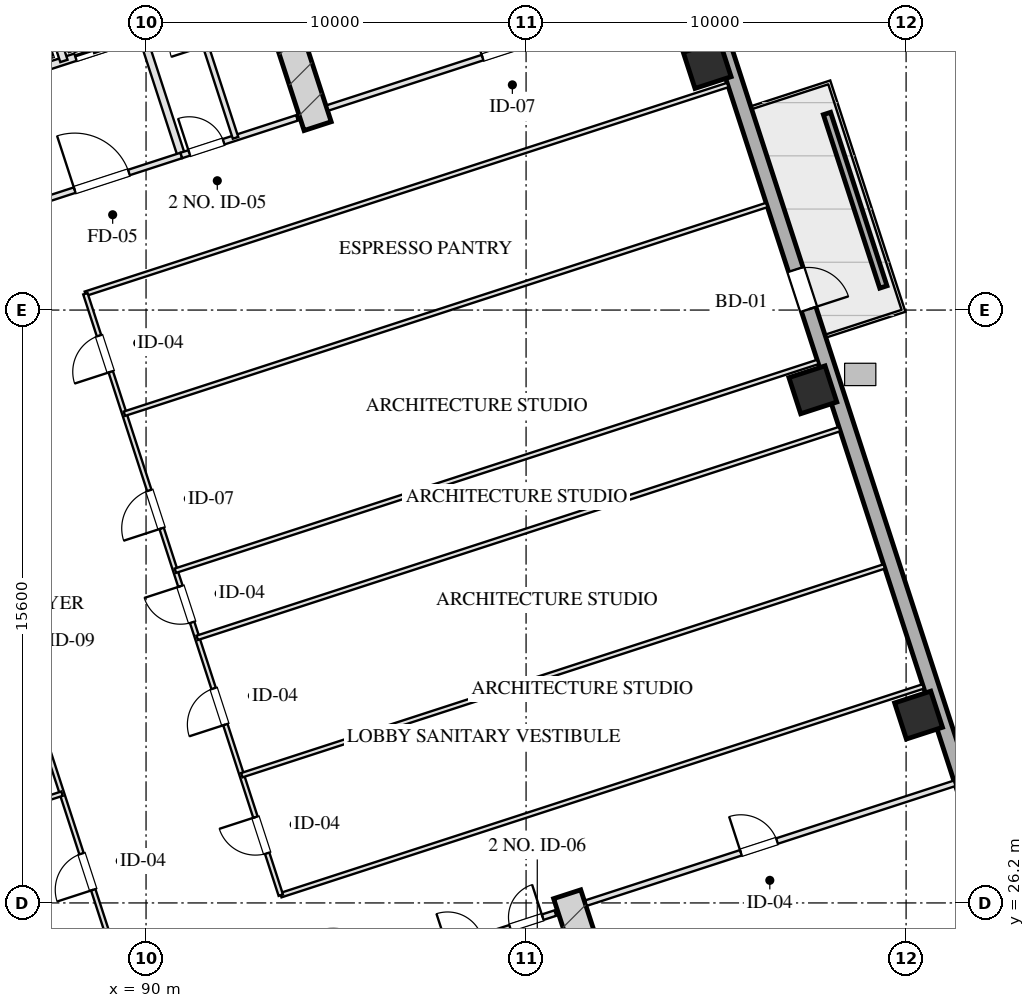
"""IFC4 building model, lengths in metres.
Left out: names, types, materials, properties, quantities, classifications, styles, units other than length and angle.
Written with IfcOpenShell. Run it as: python <this file> out.ifc"""

import sys

from ifc_helpers import new_model, si_unit, direction, frame, frame_2d, origin, origin_2d, place, context, subcontext, project, spatial, rectangle, hollow_rectangle, extrude, element, fill, save


model = new_model("IFC4")
c1 = context("Model", 3, precision=1e-05, world=origin(), true_north=direction((0.0, 1.0)))
c2 = subcontext(c1, "Body", "Model", "MODEL_VIEW")
j1 = project(units=[si_unit("LENGTHUNIT", "METRE"), si_unit("PLANEANGLEUNIT", "RADIAN")], contexts=[c1])
p1 = place(None, origin())
s1 = spatial("IfcSite", under=j1, at=p1, CompositionType="ELEMENT")
p2 = place(p1, origin())
s2 = spatial("IfcBuilding", under=s1, at=p2, CompositionType="ELEMENT")
p3 = place(p2, frame((0.0, 0.0, 57.5)))
s3 = spatial("IfcBuildingStorey", under=s2, at=p3, CompositionType="ELEMENT", Elevation=57.5)
for number, where, z_axis, x_axis in (
    (1, (101.082, 26.429, 0.0), (0.0, 0.0, 1.0), (0.309, -0.951, 0.0)),
    (2, (94.515, 46.639, 0.0), (0.0, 0.0, 1.0), (-0.309, 0.951, 0.0)),
):
    element("IfcWall", number, at=place(p3, frame(where, z_axis=z_axis, x_axis=x_axis)), inside=s3, PredefinedType="SHEAR", context=c2, shape_type="SweptSolid", body=[
        extrude(rectangle(XDim=9.63, YDim=0.75, at=frame_2d((4.815, 0.0))), origin(), (0.0, 0.0, 1.0), 3.45),
    ])
for number, where, z_axis, x_axis in (
    (3, (110.328, 31.142, 0.0), (0.0, 0.0, 1.0), (0.951, 0.309, 0.0)),
    (4, (107.547, 39.701, 0.0), (0.0, 0.0, 1.0), (0.951, 0.309, 0.0)),
    (5, (104.766, 48.261, 0.0), (0.0, 0.0, 1.0), (0.951, 0.309, 0.0)),
):
    element("IfcColumn", number, at=place(p3, frame(where, z_axis=z_axis, x_axis=x_axis)), inside=s3, PredefinedType="COLUMN", context=c2, shape_type="SweptSolid", body=[
        extrude(hollow_rectangle(XDim=1.0, YDim=1.0, WallThickness=0.036, at=origin_2d()), origin(), (0.0, 0.0, 1.0), 3.451),
    ])
p4 = place(p3, frame((100.345, 63.648, 0.0), z_axis=(0.0, 0.0, 1.0), x_axis=(0.309014526607, -0.951057318118, 0.0)))
e6 = element("IfcWall", 6, at=p4, inside=s3, PredefinedType="SOLIDWALL", context=c2, shape_type="SweptSolid", body=[
    extrude(rectangle(XDim=50.0, YDim=0.4, at=frame_2d((25.0, 0.0))), origin(), (0.0, 0.0, 1.0), 2.61),
])
p5 = place(p4, frame((21.85, 0.0, 0.0)))
e7 = element("IfcOpeningElement", 7, at=p5, cuts=e6, PredefinedType="OPENING", context=c2, shape_type="SweptSolid", body=[
    extrude(rectangle(XDim=1.1, YDim=2.15, at=frame_2d((0.55, 1.075))), frame((0.0, 0.21, 0.0), z_axis=(0.0, -1.0, 0.0), x_axis=(1.0, 0.0, 0.0)), (0.0, 0.0, 1.0), 0.42),
])
p6 = place(p3, frame((109.402, 42.407, 0.0), z_axis=(0.0, 0.0, 1.0), x_axis=(-0.30900096172, 0.951061725471, 0.0)))
e8 = element("IfcWall", 8, at=p6, inside=s3, PredefinedType="PARAPET", context=c2, shape_type="SweptSolid", body=[
    extrude(rectangle(XDim=4.8, YDim=0.2, at=frame_2d((2.4, 0.0))), origin(), (0.0, 0.0, 1.0), 0.75),
])
p7 = place(p3, frame((97.727, 24.944, 0.0), z_axis=(0.0, 0.0, 1.0), x_axis=(0.951036872128, 0.309077446369, 0.0)))
e9 = element("IfcWall", 9, at=p7, inside=s3, PredefinedType="PARTITIONING", context=c2, shape_type="SweptSolid", body=[
    extrude(rectangle(XDim=3.2, YDim=0.15, at=frame_2d((1.6, 0.0))), origin(), (0.0, 0.0, 1.0), 3.175),
])
p8 = place(p7, frame((0.22, 0.0, 0.0)))
e10 = element("IfcOpeningElement", 10, at=p8, cuts=e9, PredefinedType="OPENING", context=c2, shape_type="SweptSolid", body=[
    extrude(rectangle(XDim=0.95, YDim=2.05, at=frame_2d((0.475, 1.025))), frame((0.0, 0.085, 0.0), z_axis=(0.0, -1.0, 0.0), x_axis=(1.0, 0.0, 0.0)), (0.0, 0.0, 1.0), 0.17),
])
p9 = place(p7, frame((1.95, 0.0, 0.0)))
e11 = element("IfcOpeningElement", 11, at=p9, cuts=e9, PredefinedType="OPENING", context=c2, shape_type="SweptSolid", body=[
    extrude(rectangle(XDim=0.9, YDim=2.05, at=frame_2d((0.45, 1.025))), frame((0.0, 0.085, 0.0), z_axis=(0.0, -1.0, 0.0), x_axis=(1.0, 0.0, 0.0)), (0.0, 0.0, 1.0), 0.17),
])
p10 = place(p3, frame((90.928, 45.868, 0.0), z_axis=(0.0, 0.0, 1.0), x_axis=(-0.309042196757, 0.951048327176, 0.0)))
e12 = element("IfcWall", 12, at=p10, inside=s3, PredefinedType="PARTITIONING", context=c2, shape_type="SweptSolid", body=[
    extrude(rectangle(XDim=8.43, YDim=0.2, at=frame_2d((4.215, 0.0))), origin(), (0.0, 0.0, 1.0), 3.175),
])
p11 = place(p3, frame((86.743, 44.508, 0.0), z_axis=(0.0, 0.0, 1.0), x_axis=(0.951063829732, 0.308994485023, 0.0)))
e13 = element("IfcWall", 13, at=p11, inside=s3, PredefinedType="PARTITIONING", context=c2, shape_type="SweptSolid", body=[
    extrude(rectangle(XDim=4.4, YDim=0.15, at=frame_2d((2.2, 0.0))), origin(), (0.0, 0.0, 1.0), 3.175),
])
p12 = place(p11, frame((1.45, 0.0, 0.0)))
e14 = element("IfcOpeningElement", 14, at=p12, cuts=e13, PredefinedType="OPENING", context=c2, shape_type="SweptSolid", body=[
    extrude(rectangle(XDim=1.5, YDim=2.05, at=frame_2d((0.75, 1.025))), frame((0.0, 0.085, 0.0), z_axis=(0.0, -1.0, 0.0), x_axis=(1.0, 0.0, 0.0)), (0.0, 0.0, 1.0), 0.17),
])
p13 = place(p3, frame((85.718, 47.666, 0.0), z_axis=(0.0, 0.0, 1.0), x_axis=(0.951058531764, 0.30901079133, 0.0)))
e15 = element("IfcWall", 15, at=p13, inside=s3, PredefinedType="PARTITIONING", context=c2, shape_type="SweptSolid", body=[
    extrude(rectangle(XDim=4.4, YDim=0.2, at=frame_2d((2.2, 0.0))), origin(), (0.0, 0.0, 1.0), 3.175),
])
p14 = place(p13, frame((0.45, 0.0, 0.0)))
e16 = element("IfcOpeningElement", 16, at=p14, cuts=e15, PredefinedType="OPENING", context=c2, shape_type="SweptSolid", body=[
    extrude(rectangle(XDim=1.1, YDim=2.05, at=frame_2d((0.55, 1.025))), frame((0.0, 0.11, 0.0), z_axis=(0.0, -1.0, 0.0), x_axis=(1.0, 0.0, 0.0)), (0.0, 0.0, 1.0), 0.22),
])
p15 = place(p13, frame((2.55, 0.0, 0.0)))
e17 = element("IfcOpeningElement", 17, at=p15, cuts=e15, PredefinedType="OPENING", context=c2, shape_type="SweptSolid", body=[
    extrude(rectangle(XDim=1.1, YDim=2.05, at=frame_2d((0.55, 1.025))), frame((0.0, 0.11, 0.0), z_axis=(0.0, -1.0, 0.0), x_axis=(1.0, 0.0, 0.0)), (0.0, 0.0, 1.0), 0.22),
])
p16 = place(p3, frame((87.838, 48.354, 0.0), z_axis=(0.0, 0.0, 1.0), x_axis=(-0.3090093719, 0.951058992953, 0.0)))
e18 = element("IfcWall", 18, at=p16, inside=s3, PredefinedType="PARTITIONING", context=c2, shape_type="SweptSolid", body=[
    extrude(rectangle(XDim=5.11, YDim=0.2, at=frame_2d((2.555, 0.0))), origin(), (0.0, 0.0, 1.0), 3.175),
])
p17 = place(p3, frame((90.928, 45.868, 0.0), z_axis=(0.0, 0.0, 1.0), x_axis=(0.951059297078, 0.309008435874, 0.0)))
e19 = element("IfcWall", 19, at=p17, inside=s3, PredefinedType="PARTITIONING", context=c2, shape_type="SweptSolid", body=[
    extrude(rectangle(XDim=3.2, YDim=0.15, at=frame_2d((1.6, 0.0))), origin(), (0.0, 0.0, 1.0), 3.175),
])
p18 = place(p17, frame((0.22, 0.0, 0.0)))
e20 = element("IfcOpeningElement", 20, at=p18, cuts=e19, PredefinedType="OPENING", context=c2, shape_type="SweptSolid", body=[
    extrude(rectangle(XDim=0.95, YDim=2.05, at=frame_2d((0.475, 1.025))), frame((0.0, 0.085, 0.0), z_axis=(0.0, -1.0, 0.0), x_axis=(1.0, 0.0, 0.0)), (0.0, 0.0, 1.0), 0.17),
])
p19 = place(p3, frame((92.355, 46.331, 0.0), z_axis=(0.0, 0.0, 1.0), x_axis=(-0.309007490203, 0.951059604335, 0.0)))
e21 = element("IfcWall", 21, at=p19, inside=s3, PredefinedType="PARTITIONING", context=c2, shape_type="SweptSolid", body=[
    extrude(rectangle(XDim=8.43, YDim=0.15, at=frame_2d((4.215, 0.0))), origin(), (0.0, 0.0, 1.0), 3.175),
])
p20 = place(p19, frame((2.55, 0.0, 0.0)))
e22 = element("IfcOpeningElement", 22, at=p20, cuts=e21, PredefinedType="OPENING", context=c2, shape_type="SweptSolid", body=[
    extrude(rectangle(XDim=0.95, YDim=2.05, at=frame_2d((0.475, 1.025))), frame((0.0, 0.085, 0.0), z_axis=(0.0, -1.0, 0.0), x_axis=(1.0, 0.0, 0.0)), (0.0, 0.0, 1.0), 0.17),
])
p21 = place(p19, frame((5.8, 0.0, 0.0)))
e23 = element("IfcOpeningElement", 23, at=p21, cuts=e21, PredefinedType="OPENING", context=c2, shape_type="SweptSolid", body=[
    extrude(rectangle(XDim=0.9, YDim=2.05, at=frame_2d((0.45, 1.025))), frame((0.0, 0.085, 0.0), z_axis=(0.0, -1.0, 0.0), x_axis=(1.0, 0.0, 0.0)), (0.0, 0.0, 1.0), 0.17),
])
p22 = place(p3, frame((101.578, 26.196, 0.0), z_axis=(0.0, 0.0, 1.0), x_axis=(0.951059043131, 0.309009217467, 0.0)))
e24 = element("IfcWall", 24, at=p22, inside=s3, PredefinedType="PARTITIONING", context=c2, shape_type="SweptSolid", body=[
    extrude(rectangle(XDim=10.2, YDim=0.15, at=frame_2d((5.1, 0.0))), origin(), (0.0, 0.0, 1.0), 3.175),
])
p23 = place(p22, frame((4.284, 0.0, 0.0)))
e25 = element("IfcOpeningElement", 25, at=p23, cuts=e24, PredefinedType="OPENING", context=c2, shape_type="SweptSolid", body=[
    extrude(rectangle(XDim=1.0, YDim=2.05, at=frame_2d((0.5, 1.025))), frame((0.0, 0.085, 0.0), z_axis=(0.0, -1.0, 0.0), x_axis=(1.0, 0.0, 0.0)), (0.0, 0.0, 1.0), 0.17),
])
p24 = place(p3, frame((94.78, 47.119, 0.0), z_axis=(0.0, 0.0, 1.0), x_axis=(0.951054294345, 0.309023832749, 0.0)))
e26 = element("IfcWall", 26, at=p24, inside=s3, PredefinedType="PARTITIONING", context=c2, shape_type="SweptSolid", body=[
    extrude(rectangle(XDim=10.2, YDim=0.15, at=frame_2d((5.1, 0.0))), origin(), (0.0, 0.0, 1.0), 3.175),
])
p25 = place(p24, frame((4.284, 0.0, 0.0)))
e27 = element("IfcOpeningElement", 27, at=p25, cuts=e26, PredefinedType="OPENING", context=c2, shape_type="SweptSolid", body=[
    extrude(rectangle(XDim=1.05, YDim=2.05, at=frame_2d((0.525, 1.025))), frame((0.0, 0.085, 0.0), z_axis=(0.0, -1.0, 0.0), x_axis=(1.0, 0.0, 0.0)), (0.0, 0.0, 1.0), 0.17),
])
p26 = place(p3, frame((93.546, 26.404, 0.0), z_axis=(0.0, 0.0, 1.0), x_axis=(0.951058189574, 0.309011844505, 0.0)))
e28 = element("IfcWall", 28, at=p26, inside=s3, PredefinedType="PARTITIONING", context=c2, shape_type="SweptSolid", body=[
    extrude(rectangle(XDim=17.775, YDim=0.12, at=frame_2d((8.887, 0.0))), origin(), (0.0, 0.0, 1.0), 3.175),
])
p27 = place(p3, frame((88.404, 42.229, 0.0), z_axis=(0.0, 0.0, 1.0), x_axis=(0.951054152931, 0.309024267966, 0.0)))
e29 = element("IfcWall", 29, at=p27, inside=s3, PredefinedType="PARTITIONING", context=c2, shape_type="SweptSolid", body=[
    extrude(rectangle(XDim=17.775, YDim=0.12, at=frame_2d((8.888, 0.0))), origin(), (0.0, 0.0, 1.0), 3.175),
])
p28 = place(p3, frame((89.124, 24.967, 0.0), z_axis=(0.0, 0.0, 1.0), x_axis=(-0.30901773025, 0.951056277195, 0.0)))
e30 = element("IfcWall", 30, at=p28, inside=s3, PredefinedType="PARTITIONING", context=c2, shape_type="SweptSolid", body=[
    extrude(rectangle(XDim=16.64, YDim=0.12, at=frame_2d((8.32, 0.0))), origin(), (0.0, 0.0, 1.0), 3.175),
])
p29 = place(p28, frame((1.66, 0.0, 0.0)))
e31 = element("IfcOpeningElement", 31, at=p29, cuts=e30, PredefinedType="OPENING", context=c2, shape_type="SweptSolid", body=[
    extrude(rectangle(XDim=1.0, YDim=2.05, at=frame_2d((0.5, 1.025))), frame((0.0, 0.07, 0.0), z_axis=(0.0, -1.0, 0.0), x_axis=(1.0, 0.0, 0.0)), (0.0, 0.0, 1.0), 0.14),
])
p30 = place(p28, frame((7.82, 0.0, 0.0)))
e32 = element("IfcOpeningElement", 32, at=p30, cuts=e30, PredefinedType="OPENING", context=c2, shape_type="SweptSolid", body=[
    extrude(rectangle(XDim=0.85, YDim=2.05, at=frame_2d((0.425, 1.025))), frame((0.0, 0.07, 0.0), z_axis=(0.0, -1.0, 0.0), x_axis=(1.0, 0.0, 0.0)), (0.0, 0.0, 1.0), 0.14),
])
p31 = place(p28, frame((13.98, 0.0, 0.0)))
e33 = element("IfcOpeningElement", 33, at=p31, cuts=e30, PredefinedType="OPENING", context=c2, shape_type="SweptSolid", body=[
    extrude(rectangle(XDim=1.0, YDim=2.05, at=frame_2d((0.5, 1.025))), frame((0.0, 0.07, 0.0), z_axis=(0.0, -1.0, 0.0), x_axis=(1.0, 0.0, 0.0)), (0.0, 0.0, 1.0), 0.14),
])
p32 = place(p3, frame((93.546, 26.404, 0.0), z_axis=(0.0, 0.0, 1.0), x_axis=(-0.309022042254, 0.951054876125, 0.0)))
e34 = element("IfcWall", 34, at=p32, inside=s3, PredefinedType="PARTITIONING", context=c2, shape_type="SweptSolid", body=[
    extrude(rectangle(XDim=16.64, YDim=0.12, at=frame_2d((8.32, 0.0))), origin(), (0.0, 0.0, 1.0), 3.175),
])
p33 = place(p32, frame((1.16, 0.0, 0.0)))
e35 = element("IfcOpeningElement", 35, at=p33, cuts=e34, PredefinedType="OPENING", context=c2, shape_type="SweptSolid", body=[
    extrude(rectangle(XDim=1.0, YDim=2.05, at=frame_2d((0.5, 1.025))), frame((0.0, 0.07, 0.0), z_axis=(0.0, -1.0, 0.0), x_axis=(1.0, 0.0, 0.0)), (0.0, 0.0, 1.0), 0.14),
])
p34 = place(p32, frame((4.72, 0.0, 0.0)))
e36 = element("IfcOpeningElement", 36, at=p34, cuts=e34, PredefinedType="OPENING", context=c2, shape_type="SweptSolid", body=[
    extrude(rectangle(XDim=1.0, YDim=2.05, at=frame_2d((0.5, 1.025))), frame((0.0, 0.07, 0.0), z_axis=(0.0, -1.0, 0.0), x_axis=(1.0, 0.0, 0.0)), (0.0, 0.0, 1.0), 0.14),
])
p35 = place(p32, frame((7.549, 0.0, 0.0)))
e37 = element("IfcOpeningElement", 37, at=p35, cuts=e34, PredefinedType="OPENING", context=c2, shape_type="SweptSolid", body=[
    extrude(rectangle(XDim=1.0, YDim=2.05, at=frame_2d((0.5, 1.025))), frame((0.0, 0.07, 0.0), z_axis=(0.0, -1.0, 0.0), x_axis=(1.0, 0.0, 0.0)), (0.0, 0.0, 1.0), 0.14),
])
p36 = place(p32, frame((10.148, 0.0, 0.0)))
e38 = element("IfcOpeningElement", 38, at=p36, cuts=e34, PredefinedType="OPENING", context=c2, shape_type="SweptSolid", body=[
    extrude(rectangle(XDim=1.05, YDim=2.05, at=frame_2d((0.525, 1.025))), frame((0.0, 0.07, 0.0), z_axis=(0.0, -1.0, 0.0), x_axis=(1.0, 0.0, 0.0)), (0.0, 0.0, 1.0), 0.14),
])
p37 = place(p32, frame((14.48, 0.0, 0.0)))
e39 = element("IfcOpeningElement", 39, at=p37, cuts=e34, PredefinedType="OPENING", context=c2, shape_type="SweptSolid", body=[
    extrude(rectangle(XDim=1.0, YDim=2.05, at=frame_2d((0.5, 1.025))), frame((0.0, 0.07, 0.0), z_axis=(0.0, -1.0, 0.0), x_axis=(1.0, 0.0, 0.0)), (0.0, 0.0, 1.0), 0.14),
])
p38 = place(p3, frame((73.356, 24.386, 0.0), z_axis=(0.0, 0.0, 1.0), x_axis=(0.951054756643, 0.309022409974, 0.0)))
e40 = element("IfcWall", 40, at=p38, inside=s3, PredefinedType="PARTITIONING", context=c2, shape_type="SweptSolid", body=[
    extrude(rectangle(XDim=15.175, YDim=0.12, at=frame_2d((7.587, 0.0))), origin(), (0.0, 0.0, 1.0), 3.175),
])
for number, where, z_axis, x_axis in (
    (41, (92.52, 29.562, 0.0), (0.0, 0.0, 1.0), (0.951, 0.309, 0.0)),
    (42, (91.346, 33.176, 0.0), (0.0, 0.0, 1.0), (0.951, 0.309, 0.0)),
    (43, (90.772, 34.942, 0.0), (0.0, 0.0, 1.0), (0.951, 0.309, 0.0)),
    (44, (89.43, 39.072, 0.0), (0.0, 0.0, 1.0), (0.951, 0.309, 0.0)),
):
    element("IfcWall", number, at=place(p3, frame(where, z_axis=z_axis, x_axis=x_axis)), inside=s3, PredefinedType="PARTITIONING", context=c2, shape_type="SweptSolid", body=[
        extrude(rectangle(XDim=17.775, YDim=0.12, at=frame_2d((8.887, 0.0))), origin(), (0.0, 0.0, 1.0), 3.175),
    ])
p39 = place(p5, origin())
e45 = element("IfcDoor", 45, at=p39, inside=s3, OperationType="SINGLE_SWING_RIGHT", PredefinedType="DOOR", context=c2, shape_type="SweptSolid", body=[
    extrude(rectangle(XDim=1.1, YDim=2.15, at=frame_2d((0.55, 1.075))), frame((0.0, 0.025, 0.0), z_axis=(0.0, -1.0, 0.0), x_axis=(1.0, 0.0, 0.0)), (0.0, 0.0, 1.0), 0.05),
])
fill(e7, e45)
p40 = place(p9, origin())
e46 = element("IfcDoor", 46, at=p40, inside=s3, OperationType="SINGLE_SWING_RIGHT", PredefinedType="DOOR", context=c2, shape_type="SweptSolid", body=[
    extrude(rectangle(XDim=0.9, YDim=2.05, at=frame_2d((0.45, 1.025))), frame((0.0, 0.025, 0.0), z_axis=(0.0, -1.0, 0.0), x_axis=(1.0, 0.0, 0.0)), (0.0, 0.0, 1.0), 0.05),
])
fill(e11, e46)
p41 = place(p12, origin())
e47 = element("IfcDoor", 47, at=p41, inside=s3, OperationType="SINGLE_SWING_LEFT", PredefinedType="DOOR", context=c2, shape_type="SweptSolid", body=[
    extrude(rectangle(XDim=1.5, YDim=2.05, at=frame_2d((0.75, 1.025))), frame((0.0, 0.025, 0.0), z_axis=(0.0, -1.0, 0.0), x_axis=(1.0, 0.0, 0.0)), (0.0, 0.0, 1.0), 0.05),
])
fill(e14, e47)
p42 = place(p15, origin())
e48 = element("IfcDoor", 48, at=p42, inside=s3, OperationType="DOUBLE_DOOR_SLIDING", PredefinedType="DOOR", context=c2, shape_type="SweptSolid", body=[
    extrude(rectangle(XDim=1.1, YDim=2.05, at=frame_2d((0.55, 1.025))), frame((0.0, 0.025, 0.0), z_axis=(0.0, -1.0, 0.0), x_axis=(1.0, 0.0, 0.0)), (0.0, 0.0, 1.0), 0.05),
])
fill(e17, e48)
p43 = place(p18, origin())
e49 = element("IfcDoor", 49, at=p43, inside=s3, OperationType="SINGLE_SWING_LEFT", PredefinedType="DOOR", context=c2, shape_type="SweptSolid", body=[
    extrude(rectangle(XDim=0.95, YDim=2.05, at=frame_2d((0.475, 1.025))), frame((0.0, 0.025, 0.0), z_axis=(0.0, -1.0, 0.0), x_axis=(1.0, 0.0, 0.0)), (0.0, 0.0, 1.0), 0.05),
])
fill(e20, e49)
p44 = place(p23, origin())
e50 = element("IfcDoor", 50, at=p44, inside=s3, OperationType="SINGLE_SWING_LEFT", PredefinedType="DOOR", context=c2, shape_type="SweptSolid", body=[
    extrude(rectangle(XDim=1.0, YDim=2.05, at=frame_2d((0.5, 1.025))), frame((0.0, 0.025, 0.0), z_axis=(0.0, -1.0, 0.0), x_axis=(1.0, 0.0, 0.0)), (0.0, 0.0, 1.0), 0.05),
])
fill(e25, e50)
p45 = place(p25, origin())
e51 = element("IfcDoor", 51, at=p45, inside=s3, OperationType="SINGLE_SWING_LEFT", PredefinedType="DOOR", context=c2, shape_type="SweptSolid", body=[
    extrude(rectangle(XDim=1.05, YDim=2.05, at=frame_2d((0.525, 1.025))), frame((0.0, 0.025, 0.0), z_axis=(0.0, -1.0, 0.0), x_axis=(1.0, 0.0, 0.0)), (0.0, 0.0, 1.0), 0.05),
])
fill(e27, e51)
p46 = place(p29, origin())
e52 = element("IfcDoor", 52, at=p46, inside=s3, OperationType="SINGLE_SWING_LEFT", PredefinedType="DOOR", context=c2, shape_type="SweptSolid", body=[
    extrude(rectangle(XDim=1.0, YDim=2.05, at=frame_2d((0.5, 1.025))), frame((0.0, 0.025, 0.0), z_axis=(0.0, -1.0, 0.0), x_axis=(1.0, 0.0, 0.0)), (0.0, 0.0, 1.0), 0.05),
])
fill(e31, e52)
p47 = place(p33, origin())
e53 = element("IfcDoor", 53, at=p47, inside=s3, OperationType="SINGLE_SWING_RIGHT", PredefinedType="DOOR", context=c2, shape_type="SweptSolid", body=[
    extrude(rectangle(XDim=1.0, YDim=2.05, at=frame_2d((0.5, 1.025))), frame((0.0, 0.025, 0.0), z_axis=(0.0, -1.0, 0.0), x_axis=(1.0, 0.0, 0.0)), (0.0, 0.0, 1.0), 0.05),
])
fill(e35, e53)
p48 = place(p34, origin())
e54 = element("IfcDoor", 54, at=p48, inside=s3, OperationType="SINGLE_SWING_LEFT", PredefinedType="DOOR", context=c2, shape_type="SweptSolid", body=[
    extrude(rectangle(XDim=1.0, YDim=2.05, at=frame_2d((0.5, 1.025))), frame((0.0, 0.025, 0.0), z_axis=(0.0, -1.0, 0.0), x_axis=(1.0, 0.0, 0.0)), (0.0, 0.0, 1.0), 0.05),
])
fill(e36, e54)
p49 = place(p35, origin())
e55 = element("IfcDoor", 55, at=p49, inside=s3, OperationType="SINGLE_SWING_RIGHT", PredefinedType="DOOR", context=c2, shape_type="SweptSolid", body=[
    extrude(rectangle(XDim=1.0, YDim=2.05, at=frame_2d((0.5, 1.025))), frame((0.0, 0.025, 0.0), z_axis=(0.0, -1.0, 0.0), x_axis=(1.0, 0.0, 0.0)), (0.0, 0.0, 1.0), 0.05),
])
fill(e37, e55)
p50 = place(p36, origin())
e56 = element("IfcDoor", 56, at=p50, inside=s3, OperationType="SINGLE_SWING_LEFT", PredefinedType="DOOR", context=c2, shape_type="SweptSolid", body=[
    extrude(rectangle(XDim=1.05, YDim=2.05, at=frame_2d((0.525, 1.025))), frame((0.0, 0.025, 0.0), z_axis=(0.0, -1.0, 0.0), x_axis=(1.0, 0.0, 0.0)), (0.0, 0.0, 1.0), 0.05),
])
fill(e38, e56)
p51 = place(p37, origin())
e57 = element("IfcDoor", 57, at=p51, inside=s3, OperationType="SINGLE_SWING_LEFT", PredefinedType="DOOR", context=c2, shape_type="SweptSolid", body=[
    extrude(rectangle(XDim=1.0, YDim=2.05, at=frame_2d((0.5, 1.025))), frame((0.0, 0.025, 0.0), z_axis=(0.0, -1.0, 0.0), x_axis=(1.0, 0.0, 0.0)), (0.0, 0.0, 1.0), 0.05),
])
fill(e39, e57)
save(model, sys.argv[1])
